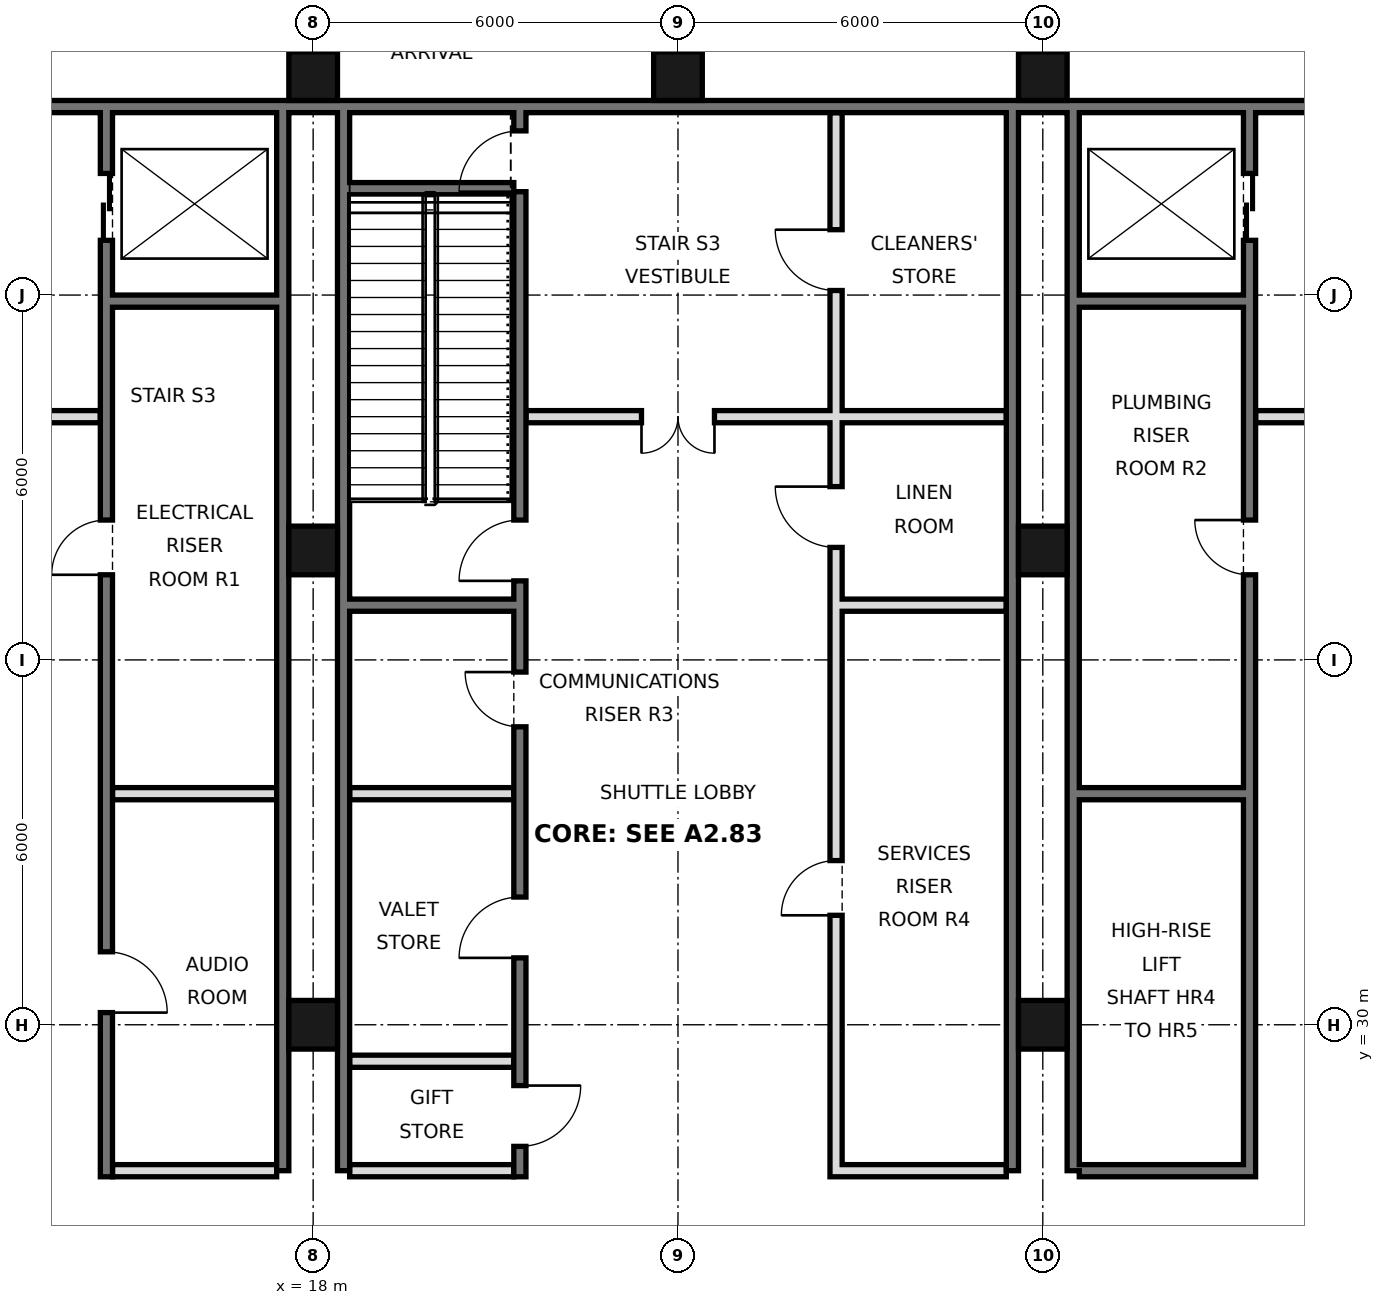
"""IFC4 building model, lengths in metres.
Left out: names, types, materials, properties, quantities, classifications, styles, units other than length and angle.
Written with IfcOpenShell. Run it as: python <this file> out.ifc"""

import sys

from ifc_helpers import new_model, si_unit, direction, frame, frame_2d, origin, origin_2d, place, context, subcontext, project, spatial, rectangle, hollow_rectangle, extrude, element, fill, save


model = new_model("IFC4")
c1 = context("Model", 3, precision=1e-05, world=origin(), true_north=direction((0.0, 1.0)))
c2 = subcontext(c1, "Body", "Model", "MODEL_VIEW")
j1 = project(units=[si_unit("LENGTHUNIT", "METRE"), si_unit("PLANEANGLEUNIT", "RADIAN")], contexts=[c1])
p1 = place(None, origin())
s1 = spatial("IfcSite", under=j1, at=p1, CompositionType="ELEMENT")
p2 = place(p1, origin())
s2 = spatial("IfcBuilding", under=s1, at=p2, CompositionType="ELEMENT")
p3 = place(p2, frame((0.0, 0.0, 331.2)))
s3 = spatial("IfcBuildingStorey", under=s2, at=p3, CompositionType="ELEMENT", Elevation=331.2)
for number, where, z_axis, x_axis in (
    (1, (18.0, 30.0, 0.0), (0.0, 0.0, 1.0), (1.0, 0.0, 0.0)),
    (2, (18.0, 37.8, 0.0), (0.0, 0.0, 1.0), (1.0, 0.0, 0.0)),
    (3, (18.0, 45.6, 0.0), (0.0, 0.0, 1.0), (1.0, 0.0, 0.0)),
    (4, (24.0, 45.6, 0.0), (0.0, 0.0, 1.0), (1.0, 0.0, 0.0)),
    (5, (30.0, 30.0, 0.0), (0.0, 0.0, 1.0), (1.0, 0.0, 0.0)),
    (6, (30.0, 37.8, 0.0), (0.0, 0.0, 1.0), (1.0, 0.0, 0.0)),
    (7, (30.0, 45.6, 0.0), (0.0, 0.0, 1.0), (1.0, 0.0, 0.0)),
):
    element("IfcColumn", number, at=place(p3, frame(where, z_axis=z_axis, x_axis=x_axis)), inside=s3, PredefinedType="COLUMN", context=c2, shape_type="SweptSolid", body=[
        extrude(hollow_rectangle(XDim=0.8, YDim=0.8, WallThickness=0.025, at=origin_2d()), origin(), (0.0, 0.0, 1.0), 6.6),
    ])
p4 = place(p3, frame((6.6, 45.1, 0.0), z_axis=(0.0, 0.0, 1.0), x_axis=(1.0, 0.0, 0.0)))
e8 = element("IfcWall", 8, at=p4, inside=s3, PredefinedType="SOLIDWALL", context=c2, shape_type="SweptSolid", body=[
    extrude(rectangle(XDim=34.8, YDim=0.2, at=frame_2d((17.4, 0.0))), origin(), (0.0, 0.0, 1.0), 6.35),
])
for number, where, z_axis, x_axis in (
    (9, (17.5, 27.6, 0.0), (0.0, 0.0, 1.0), (0.0, 1.0, 0.0)),
    (10, (18.5, 27.6, 0.0), (0.0, 0.0, 1.0), (0.0, 1.0, 0.0)),
    (11, (29.5, 27.6, 0.0), (0.0, 0.0, 1.0), (0.0, 1.0, 0.0)),
    (12, (30.5, 27.6, 0.0), (0.0, 0.0, 1.0), (0.0, 1.0, 0.0)),
):
    element("IfcWall", number, at=place(p3, frame(where, z_axis=z_axis, x_axis=x_axis)), inside=s3, PredefinedType="SOLIDWALL", context=c2, shape_type="SweptSolid", body=[
        extrude(rectangle(XDim=17.5, YDim=0.2, at=frame_2d((8.75, 0.0))), origin(), (0.0, 0.0, 1.0), 6.35),
    ])
p5 = place(p3, frame((14.6, 27.5, 0.0), z_axis=(0.0, 0.0, 1.0), x_axis=(0.0, 1.0, 0.0)))
e13 = element("IfcWall", 13, at=p5, inside=s3, PredefinedType="SOLIDWALL", context=c2, shape_type="SweptSolid", body=[
    extrude(rectangle(XDim=17.5, YDim=0.2, at=frame_2d((8.75, 0.0))), origin(), (0.0, 0.0, 1.0), 6.35),
])
p6 = place(p5, frame((15.4, 0.0, 0.0)))
e14 = element("IfcOpeningElement", 14, at=p6, cuts=e13, PredefinedType="OPENING", context=c2, shape_type="SweptSolid", body=[
    extrude(rectangle(XDim=1.1, YDim=2.1, at=frame_2d((0.55, 1.05))), frame((0.0, 0.11, 0.0), z_axis=(0.0, -1.0, 0.0), x_axis=(1.0, 0.0, 0.0)), (0.0, 0.0, 1.0), 0.22),
])
p7 = place(p5, frame((2.7, 0.0, 0.0)))
e15 = element("IfcOpeningElement", 15, at=p7, cuts=e13, PredefinedType="OPENING", context=c2, shape_type="SweptSolid", body=[
    extrude(rectangle(XDim=1.0, YDim=2.1, at=frame_2d((0.5, 1.05))), frame((0.0, 0.11, 0.0), z_axis=(0.0, -1.0, 0.0), x_axis=(1.0, 0.0, 0.0)), (0.0, 0.0, 1.0), 0.22),
])
p8 = place(p5, frame((9.9, 0.0, 0.0)))
e16 = element("IfcOpeningElement", 16, at=p8, cuts=e13, PredefinedType="OPENING", context=c2, shape_type="SweptSolid", body=[
    extrude(rectangle(XDim=0.9, YDim=2.1, at=frame_2d((0.45, 1.05))), frame((0.0, 0.11, 0.0), z_axis=(0.0, -1.0, 0.0), x_axis=(1.0, 0.0, 0.0)), (0.0, 0.0, 1.0), 0.22),
])
p9 = place(p3, frame((21.4, 27.5, 0.0), z_axis=(0.0, 0.0, 1.0), x_axis=(0.0, 1.0, 0.0)))
e17 = element("IfcWall", 17, at=p9, inside=s3, PredefinedType="SOLIDWALL", context=c2, shape_type="SweptSolid", body=[
    extrude(rectangle(XDim=17.5, YDim=0.2, at=frame_2d((8.75, 0.0))), origin(), (0.0, 0.0, 1.0), 6.35),
])
p10 = place(p9, frame((0.5, 0.0, 0.0)))
e18 = element("IfcOpeningElement", 18, at=p10, cuts=e17, PredefinedType="OPENING", context=c2, shape_type="SweptSolid", body=[
    extrude(rectangle(XDim=1.0, YDim=2.1, at=frame_2d((0.5, 1.05))), frame((0.0, 0.11, 0.0), z_axis=(0.0, -1.0, 0.0), x_axis=(1.0, 0.0, 0.0)), (0.0, 0.0, 1.0), 0.22),
])
p11 = place(p9, frame((3.6, 0.0, 0.0)))
e19 = element("IfcOpeningElement", 19, at=p11, cuts=e17, PredefinedType="OPENING", context=c2, shape_type="SweptSolid", body=[
    extrude(rectangle(XDim=1.0, YDim=2.1, at=frame_2d((0.5, 1.05))), frame((0.0, 0.11, 0.0), z_axis=(0.0, -1.0, 0.0), x_axis=(1.0, 0.0, 0.0)), (0.0, 0.0, 1.0), 0.22),
])
p12 = place(p9, frame((16.2, 0.0, 0.0)))
e20 = element("IfcOpeningElement", 20, at=p12, cuts=e17, PredefinedType="OPENING", context=c2, shape_type="SweptSolid", body=[
    extrude(rectangle(XDim=1.0, YDim=2.1, at=frame_2d((0.5, 1.05))), frame((0.0, 0.11, 0.0), z_axis=(0.0, -1.0, 0.0), x_axis=(1.0, 0.0, 0.0)), (0.0, 0.0, 1.0), 0.22),
])
p13 = place(p9, frame((9.8, 0.0, 0.0)))
e21 = element("IfcOpeningElement", 21, at=p13, cuts=e17, PredefinedType="OPENING", context=c2, shape_type="SweptSolid", body=[
    extrude(rectangle(XDim=1.0, YDim=2.1, at=frame_2d((0.5, 1.05))), frame((0.0, 0.11, 0.0), z_axis=(0.0, -1.0, 0.0), x_axis=(1.0, 0.0, 0.0)), (0.0, 0.0, 1.0), 0.22),
])
p14 = place(p9, frame((7.4, 0.0, 0.0)))
e22 = element("IfcOpeningElement", 22, at=p14, cuts=e17, PredefinedType="OPENING", context=c2, shape_type="SweptSolid", body=[
    extrude(rectangle(XDim=0.9, YDim=2.1, at=frame_2d((0.45, 1.05))), frame((0.0, 0.11, 0.0), z_axis=(0.0, -1.0, 0.0), x_axis=(1.0, 0.0, 0.0)), (0.0, 0.0, 1.0), 0.22),
])
p15 = place(p3, frame((26.6, 27.5, 0.0), z_axis=(0.0, 0.0, 1.0), x_axis=(0.0, 1.0, 0.0)))
e23 = element("IfcWall", 23, at=p15, inside=s3, PredefinedType="SOLIDWALL", context=c2, shape_type="SweptSolid", body=[
    extrude(rectangle(XDim=17.5, YDim=0.2, at=frame_2d((8.75, 0.0))), origin(), (0.0, 0.0, 1.0), 6.35),
])
p16 = place(p15, frame((4.3, 0.0, 0.0)))
e24 = element("IfcOpeningElement", 24, at=p16, cuts=e23, PredefinedType="OPENING", context=c2, shape_type="SweptSolid", body=[
    extrude(rectangle(XDim=0.9, YDim=2.1, at=frame_2d((0.45, 1.05))), frame((0.0, 0.11, 0.0), z_axis=(0.0, -1.0, 0.0), x_axis=(1.0, 0.0, 0.0)), (0.0, 0.0, 1.0), 0.22),
])
p17 = place(p15, frame((10.35, 0.0, 0.0)))
e25 = element("IfcOpeningElement", 25, at=p17, cuts=e23, PredefinedType="OPENING", context=c2, shape_type="SweptSolid", body=[
    extrude(rectangle(XDim=1.0, YDim=2.1, at=frame_2d((0.5, 1.05))), frame((0.0, 0.11, 0.0), z_axis=(0.0, -1.0, 0.0), x_axis=(1.0, 0.0, 0.0)), (0.0, 0.0, 1.0), 0.22),
])
p18 = place(p15, frame((14.575, 0.0, 0.0)))
e26 = element("IfcOpeningElement", 26, at=p18, cuts=e23, PredefinedType="OPENING", context=c2, shape_type="SweptSolid", body=[
    extrude(rectangle(XDim=1.0, YDim=2.1, at=frame_2d((0.5, 1.05))), frame((0.0, 0.11, 0.0), z_axis=(0.0, -1.0, 0.0), x_axis=(1.0, 0.0, 0.0)), (0.0, 0.0, 1.0), 0.22),
])
p19 = place(p3, frame((33.4, 27.5, 0.0), z_axis=(0.0, 0.0, 1.0), x_axis=(0.0, 1.0, 0.0)))
e27 = element("IfcWall", 27, at=p19, inside=s3, PredefinedType="SOLIDWALL", context=c2, shape_type="SweptSolid", body=[
    extrude(rectangle(XDim=17.5, YDim=0.2, at=frame_2d((8.75, 0.0))), origin(), (0.0, 0.0, 1.0), 6.35),
])
p20 = place(p19, frame((15.4, 0.0, 0.0)))
e28 = element("IfcOpeningElement", 28, at=p20, cuts=e27, PredefinedType="OPENING", context=c2, shape_type="SweptSolid", body=[
    extrude(rectangle(XDim=1.1, YDim=2.1, at=frame_2d((0.55, 1.05))), frame((0.0, 0.11, 0.0), z_axis=(0.0, -1.0, 0.0), x_axis=(1.0, 0.0, 0.0)), (0.0, 0.0, 1.0), 0.22),
])
p21 = place(p19, frame((9.9, 0.0, 0.0)))
e29 = element("IfcOpeningElement", 29, at=p21, cuts=e27, PredefinedType="OPENING", context=c2, shape_type="SweptSolid", body=[
    extrude(rectangle(XDim=0.9, YDim=2.1, at=frame_2d((0.45, 1.05))), frame((0.0, 0.11, 0.0), z_axis=(0.0, -1.0, 0.0), x_axis=(1.0, 0.0, 0.0)), (0.0, 0.0, 1.0), 0.22),
])
for number, where, z_axis, x_axis in (
    (30, (14.7, 27.6, 0.0), (0.0, 0.0, 1.0), (1.0, 0.0, 0.0)),
    (31, (18.6, 27.6, 0.0), (0.0, 0.0, 1.0), (1.0, 0.0, 0.0)),
):
    element("IfcWall", number, at=place(p3, frame(where, z_axis=z_axis, x_axis=x_axis)), inside=s3, PredefinedType="PARTITIONING", context=c2, shape_type="SweptSolid", body=[
        extrude(rectangle(XDim=2.7, YDim=0.2, at=frame_2d((1.35, 0.0))), origin(), (0.0, 0.0, 1.0), 6.35),
    ])
for number, where, z_axis, x_axis in (
    (32, (26.7, 27.6, 0.0), (0.0, 0.0, 1.0), (1.0, 0.0, 0.0)),
    (33, (30.6, 27.6, 0.0), (0.0, 0.0, 1.0), (1.0, 0.0, 0.0)),
):
    element("IfcWall", number, at=place(p3, frame(where, z_axis=z_axis, x_axis=x_axis)), inside=s3, PredefinedType="SOLIDWALL", context=c2, shape_type="SweptSolid", body=[
        extrude(rectangle(XDim=2.7, YDim=0.2, at=frame_2d((1.35, 0.0))), origin(), (0.0, 0.0, 1.0), 6.35),
    ])
p22 = place(p3, frame((18.6, 29.4, 0.0), z_axis=(0.0, 0.0, 1.0), x_axis=(1.0, 0.0, 0.0)))
e34 = element("IfcWall", 34, at=p22, inside=s3, PredefinedType="PARTITIONING", context=c2, shape_type="SweptSolid", body=[
    extrude(rectangle(XDim=2.7, YDim=0.2, at=frame_2d((1.35, 0.0))), origin(), (0.0, 0.0, 1.0), 6.35),
])
for number, where, z_axis, x_axis in (
    (35, (14.7, 33.8, 0.0), (0.0, 0.0, 1.0), (1.0, 0.0, 0.0)),
    (36, (18.6, 33.8, 0.0), (0.0, 0.0, 1.0), (1.0, 0.0, 0.0)),
    (37, (30.6, 33.8, 0.0), (0.0, 0.0, 1.0), (1.0, 0.0, 0.0)),
    (38, (18.6, 36.9, 0.0), (0.0, 0.0, 1.0), (1.0, 0.0, 0.0)),
    (39, (26.7, 36.9, 0.0), (0.0, 0.0, 1.0), (1.0, 0.0, 0.0)),
):
    element("IfcWall", number, at=place(p3, frame(where, z_axis=z_axis, x_axis=x_axis)), inside=s3, PredefinedType="SOLIDWALL", context=c2, shape_type="SweptSolid", body=[
        extrude(rectangle(XDim=2.7, YDim=0.2, at=frame_2d((1.35, 0.0))), origin(), (0.0, 0.0, 1.0), 6.35),
    ])
p23 = place(p3, frame((21.5, 40.0, 0.0), z_axis=(0.0, 0.0, 1.0), x_axis=(1.0, 0.0, 0.0)))
e40 = element("IfcWall", 40, at=p23, inside=s3, PredefinedType="PARTITIONING", context=c2, shape_type="SweptSolid", body=[
    extrude(rectangle(XDim=7.9, YDim=0.2, at=frame_2d((3.95, 0.0))), origin(), (0.0, 0.0, 1.0), 6.35),
])
p24 = place(p23, frame((1.9, 0.0, 0.0)))
e41 = element("IfcOpeningElement", 41, at=p24, cuts=e40, PredefinedType="OPENING", context=c2, shape_type="SweptSolid", body=[
    extrude(rectangle(XDim=1.2, YDim=2.1, at=frame_2d((0.6, 1.05))), frame((0.0, 0.11, 0.0), z_axis=(0.0, -1.0, 0.0), x_axis=(1.0, 0.0, 0.0)), (0.0, 0.0, 1.0), 0.22),
])
p25 = place(p3, frame((33.5, 40.0, 0.0), z_axis=(0.0, 0.0, 1.0), x_axis=(1.0, 0.0, 0.0)))
e42 = element("IfcWall", 42, at=p25, inside=s3, PredefinedType="PARTITIONING", context=c2, shape_type="SweptSolid", body=[
    extrude(rectangle(XDim=5.0, YDim=0.2, at=frame_2d((2.5, 0.0))), origin(), (0.0, 0.0, 1.0), 6.35),
])
p26 = place(p25, frame((1.9, 0.0, 0.0)))
e43 = element("IfcOpeningElement", 43, at=p26, cuts=e42, PredefinedType="OPENING", context=c2, shape_type="SweptSolid", body=[
    extrude(rectangle(XDim=1.2, YDim=2.1, at=frame_2d((0.6, 1.05))), frame((0.0, 0.11, 0.0), z_axis=(0.0, -1.0, 0.0), x_axis=(1.0, 0.0, 0.0)), (0.0, 0.0, 1.0), 0.22),
])
p27 = place(p3, frame((9.5, 40.0, 0.0), z_axis=(0.0, 0.0, 1.0), x_axis=(1.0, 0.0, 0.0)))
e44 = element("IfcWall", 44, at=p27, inside=s3, PredefinedType="PARTITIONING", context=c2, shape_type="SweptSolid", body=[
    extrude(rectangle(XDim=5.0, YDim=0.2, at=frame_2d((2.5, 0.0))), origin(), (0.0, 0.0, 1.0), 6.35),
])
p28 = place(p27, frame((1.9, 0.0, 0.0)))
e45 = element("IfcOpeningElement", 45, at=p28, cuts=e44, PredefinedType="OPENING", context=c2, shape_type="SweptSolid", body=[
    extrude(rectangle(XDim=1.2, YDim=2.1, at=frame_2d((0.6, 1.05))), frame((0.0, 0.11, 0.0), z_axis=(0.0, -1.0, 0.0), x_axis=(1.0, 0.0, 0.0)), (0.0, 0.0, 1.0), 0.22),
])
for number, where, z_axis, x_axis in (
    (46, (14.7, 41.9, 0.0), (0.0, 0.0, 1.0), (1.0, 0.0, 0.0)),
    (47, (30.6, 41.9, 0.0), (0.0, 0.0, 1.0), (1.0, 0.0, 0.0)),
):
    element("IfcWall", number, at=place(p3, frame(where, z_axis=z_axis, x_axis=x_axis)), inside=s3, PredefinedType="SOLIDWALL", context=c2, shape_type="SweptSolid", body=[
        extrude(rectangle(XDim=2.7, YDim=0.2, at=frame_2d((1.35, 0.0))), origin(), (0.0, 0.0, 1.0), 6.35),
    ])
p29 = place(p3, frame((18.6, 43.75, 0.0), z_axis=(0.0, 0.0, 1.0), x_axis=(1.0, 0.0, 0.0)))
e48 = element("IfcWall", 48, at=p29, inside=s3, PredefinedType="SOLIDWALL", context=c2, shape_type="SweptSolid", body=[
    extrude(rectangle(XDim=2.7, YDim=0.2, at=frame_2d((1.35, 0.0))), origin(), (0.0, 0.0, 1.0), 3.1),
])
p30 = place(p24, frame((1.2, 0.0, 0.0), z_axis=(0.0, 0.0, 1.0), x_axis=(-1.0, 0.0, 0.0)))
e49 = element("IfcDoor", 49, at=p30, inside=s3, OperationType="DOUBLE_DOOR_SINGLE_SWING", PredefinedType="DOOR", context=c2, shape_type="SweptSolid", body=[
    extrude(rectangle(XDim=1.2, YDim=2.1, at=frame_2d((0.6, 1.05))), frame((0.0, 0.025, 0.0), z_axis=(0.0, -1.0, 0.0), x_axis=(1.0, 0.0, 0.0)), (0.0, 0.0, 1.0), 0.05),
])
fill(e41, e49)
p31 = place(p20, origin())
e50 = element("IfcDoor", 50, at=p31, inside=s3, OperationType="DOUBLE_DOOR_SLIDING", PredefinedType="DOOR", context=c2, shape_type="SweptSolid", body=[
    extrude(rectangle(XDim=1.1, YDim=2.1, at=frame_2d((0.55, 1.05))), frame((0.0, 0.025, 0.0), z_axis=(0.0, -1.0, 0.0), x_axis=(1.0, 0.0, 0.0)), (0.0, 0.0, 1.0), 0.05),
])
fill(e28, e50)
p32 = place(p6, origin())
e51 = element("IfcDoor", 51, at=p32, inside=s3, OperationType="DOUBLE_DOOR_SLIDING", PredefinedType="DOOR", context=c2, shape_type="SweptSolid", body=[
    extrude(rectangle(XDim=1.1, YDim=2.1, at=frame_2d((0.55, 1.05))), frame((0.0, 0.025, 0.0), z_axis=(0.0, -1.0, 0.0), x_axis=(1.0, 0.0, 0.0)), (0.0, 0.0, 1.0), 0.05),
])
fill(e14, e51)
p33 = place(p10, origin())
e52 = element("IfcDoor", 52, at=p33, inside=s3, OperationType="SINGLE_SWING_RIGHT", PredefinedType="DOOR", context=c2, shape_type="SweptSolid", body=[
    extrude(rectangle(XDim=1.0, YDim=2.1, at=frame_2d((0.5, 1.05))), frame((0.0, 0.025, 0.0), z_axis=(0.0, -1.0, 0.0), x_axis=(1.0, 0.0, 0.0)), (0.0, 0.0, 1.0), 0.05),
])
fill(e18, e52)
p34 = place(p11, origin())
e53 = element("IfcDoor", 53, at=p34, inside=s3, OperationType="SINGLE_SWING_LEFT", PredefinedType="DOOR", context=c2, shape_type="SweptSolid", body=[
    extrude(rectangle(XDim=1.0, YDim=2.1, at=frame_2d((0.5, 1.05))), frame((0.0, 0.025, 0.0), z_axis=(0.0, -1.0, 0.0), x_axis=(1.0, 0.0, 0.0)), (0.0, 0.0, 1.0), 0.05),
])
fill(e19, e53)
p35 = place(p7, frame((1.0, 0.0, 0.0), z_axis=(0.0, 0.0, 1.0), x_axis=(-1.0, 0.0, 0.0)))
e54 = element("IfcDoor", 54, at=p35, inside=s3, OperationType="SINGLE_SWING_RIGHT", PredefinedType="DOOR", context=c2, shape_type="SweptSolid", body=[
    extrude(rectangle(XDim=1.0, YDim=2.1, at=frame_2d((0.5, 1.05))), frame((0.0, 0.025, 0.0), z_axis=(0.0, -1.0, 0.0), x_axis=(1.0, 0.0, 0.0)), (0.0, 0.0, 1.0), 0.05),
])
fill(e15, e54)
p36 = place(p12, origin())
e55 = element("IfcDoor", 55, at=p36, inside=s3, OperationType="SINGLE_SWING_LEFT", PredefinedType="DOOR", context=c2, shape_type="SweptSolid", body=[
    extrude(rectangle(XDim=1.0, YDim=2.1, at=frame_2d((0.5, 1.05))), frame((0.0, 0.025, 0.0), z_axis=(0.0, -1.0, 0.0), x_axis=(1.0, 0.0, 0.0)), (0.0, 0.0, 1.0), 0.05),
])
fill(e20, e55)
p37 = place(p13, origin())
e56 = element("IfcDoor", 56, at=p37, inside=s3, OperationType="SINGLE_SWING_LEFT", PredefinedType="DOOR", context=c2, shape_type="SweptSolid", body=[
    extrude(rectangle(XDim=1.0, YDim=2.1, at=frame_2d((0.5, 1.05))), frame((0.0, 0.025, 0.0), z_axis=(0.0, -1.0, 0.0), x_axis=(1.0, 0.0, 0.0)), (0.0, 0.0, 1.0), 0.05),
])
fill(e21, e56)
p38 = place(p8, origin())
e57 = element("IfcDoor", 57, at=p38, inside=s3, OperationType="SINGLE_SWING_LEFT", PredefinedType="DOOR", context=c2, shape_type="SweptSolid", body=[
    extrude(rectangle(XDim=0.9, YDim=2.1, at=frame_2d((0.45, 1.05))), frame((0.0, 0.025, 0.0), z_axis=(0.0, -1.0, 0.0), x_axis=(1.0, 0.0, 0.0)), (0.0, 0.0, 1.0), 0.05),
])
fill(e16, e57)
p39 = place(p21, frame((0.9, 0.0, 0.0), z_axis=(0.0, 0.0, 1.0), x_axis=(-1.0, 0.0, 0.0)))
e58 = element("IfcDoor", 58, at=p39, inside=s3, OperationType="SINGLE_SWING_LEFT", PredefinedType="DOOR", context=c2, shape_type="SweptSolid", body=[
    extrude(rectangle(XDim=0.9, YDim=2.1, at=frame_2d((0.45, 1.05))), frame((0.0, 0.025, 0.0), z_axis=(0.0, -1.0, 0.0), x_axis=(1.0, 0.0, 0.0)), (0.0, 0.0, 1.0), 0.05),
])
fill(e29, e58)
p40 = place(p14, frame((0.9, 0.0, 0.0), z_axis=(0.0, 0.0, 1.0), x_axis=(-1.0, 0.0, 0.0)))
e59 = element("IfcDoor", 59, at=p40, inside=s3, OperationType="SINGLE_SWING_LEFT", PredefinedType="DOOR", context=c2, shape_type="SweptSolid", body=[
    extrude(rectangle(XDim=0.9, YDim=2.1, at=frame_2d((0.45, 1.05))), frame((0.0, 0.025, 0.0), z_axis=(0.0, -1.0, 0.0), x_axis=(1.0, 0.0, 0.0)), (0.0, 0.0, 1.0), 0.05),
])
fill(e22, e59)
p41 = place(p16, origin())
e60 = element("IfcDoor", 60, at=p41, inside=s3, OperationType="SINGLE_SWING_LEFT", PredefinedType="DOOR", context=c2, shape_type="SweptSolid", body=[
    extrude(rectangle(XDim=0.9, YDim=2.1, at=frame_2d((0.45, 1.05))), frame((0.0, 0.025, 0.0), z_axis=(0.0, -1.0, 0.0), x_axis=(1.0, 0.0, 0.0)), (0.0, 0.0, 1.0), 0.05),
])
fill(e24, e60)
p42 = place(p17, frame((1.0, 0.0, 0.0), z_axis=(0.0, 0.0, 1.0), x_axis=(-1.0, 0.0, 0.0)))
e61 = element("IfcDoor", 61, at=p42, inside=s3, OperationType="SINGLE_SWING_LEFT", PredefinedType="DOOR", context=c2, shape_type="SweptSolid", body=[
    extrude(rectangle(XDim=1.0, YDim=2.1, at=frame_2d((0.5, 1.05))), frame((0.0, 0.025, 0.0), z_axis=(0.0, -1.0, 0.0), x_axis=(1.0, 0.0, 0.0)), (0.0, 0.0, 1.0), 0.05),
])
fill(e25, e61)
p43 = place(p18, frame((1.0, 0.0, 0.0), z_axis=(0.0, 0.0, 1.0), x_axis=(-1.0, 0.0, 0.0)))
e62 = element("IfcDoor", 62, at=p43, inside=s3, OperationType="SINGLE_SWING_LEFT", PredefinedType="DOOR", context=c2, shape_type="SweptSolid", body=[
    extrude(rectangle(XDim=1.0, YDim=2.1, at=frame_2d((0.5, 1.05))), frame((0.0, 0.025, 0.0), z_axis=(0.0, -1.0, 0.0), x_axis=(1.0, 0.0, 0.0)), (0.0, 0.0, 1.0), 0.05),
])
fill(e26, e62)
save(model, sys.argv[1])
